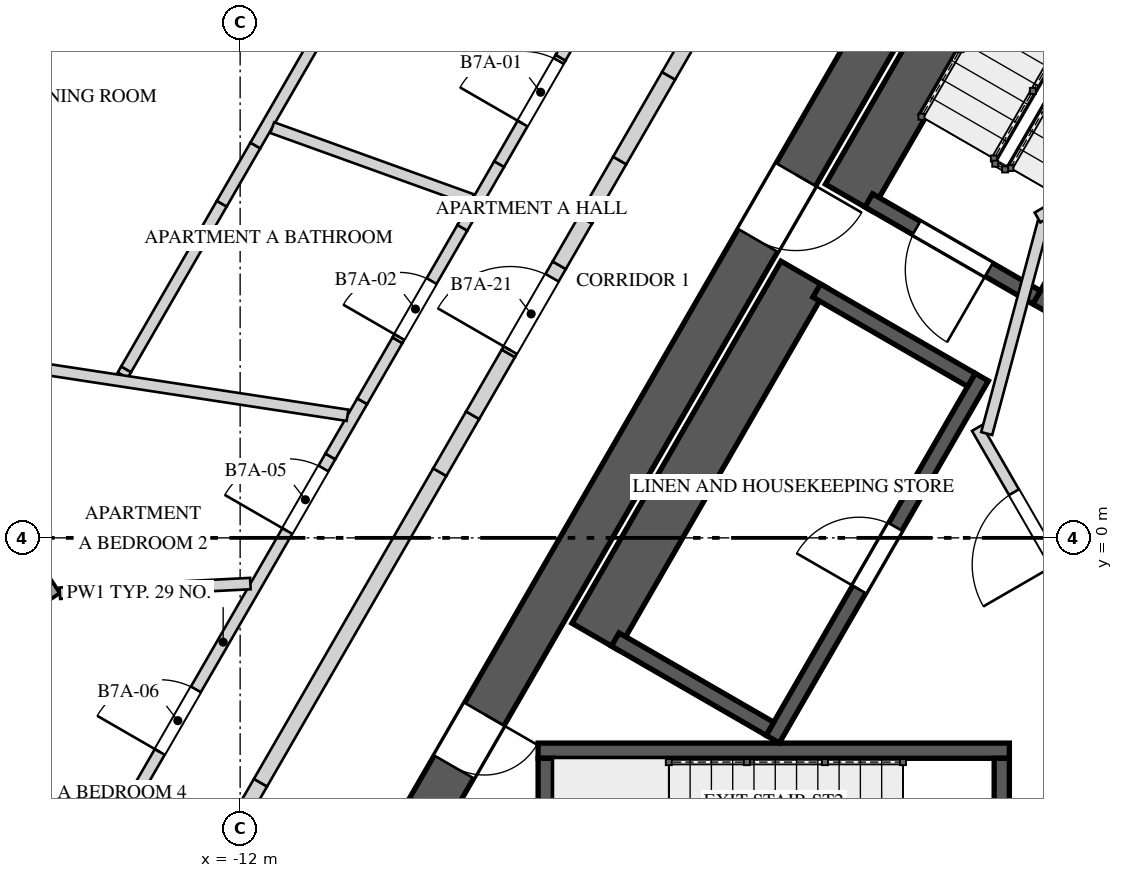
"""IFC4 building model, lengths in metres.
Left out: names, types, materials, properties, quantities, classifications, styles, units other than length and angle.
Written with IfcOpenShell. Run it as: python <this file> out.ifc"""

import sys

from ifc_helpers import new_model, si_unit, direction, frame, frame_2d, origin, place, context, subcontext, project, spatial, polyline, rectangle, outline, extrude, element, fill, save


model = new_model("IFC4")
c1 = context("Model", 3, precision=1e-05, world=origin(), true_north=direction((0.0, 1.0)))
c2 = subcontext(c1, "Body", "Model", "MODEL_VIEW")
j1 = project(units=[si_unit("LENGTHUNIT", "METRE"), si_unit("PLANEANGLEUNIT", "RADIAN")], contexts=[c1])
p1 = place(None, origin())
s1 = spatial("IfcSite", under=j1, at=p1, CompositionType="ELEMENT")
p2 = place(p1, origin())
s2 = spatial("IfcBuilding", under=s1, at=p2, CompositionType="ELEMENT")
p3 = place(p2, frame((0.0, 0.0, 274.4)))
s3 = spatial("IfcBuildingStorey", under=s2, at=p3, CompositionType="ELEMENT", Elevation=274.4)
p4 = place(p3, frame((-1.27, 10.7, 0.0), z_axis=(0.0, 0.0, 1.0), x_axis=(-0.499999536116, -0.866025671608, 0.0)))
e1 = element("IfcWall", 1, at=p4, inside=s3, PredefinedType="SHEAR", context=c2, shape_type="SweptSolid", body=[
    extrude(rectangle(XDim=17.263, YDim=0.6, at=frame_2d((8.631, 0.0))), origin(), (0.0, 0.0, 1.0), 4.0),
])
p5 = place(p4, frame((6.836, 0.0, 0.0)))
e2 = element("IfcOpeningElement", 2, at=p5, cuts=e1, PredefinedType="OPENING", context=c2, shape_type="SweptSolid", body=[
    extrude(rectangle(XDim=1.0, YDim=2.4, at=frame_2d((0.5, 1.2))), frame((0.0, 0.31, 0.0), z_axis=(0.0, -1.0, 0.0), x_axis=(1.0, 0.0, 0.0)), (0.0, 0.0, 1.0), 0.62),
])
p6 = place(p4, frame((15.034, 0.0, 0.0)))
e3 = element("IfcOpeningElement", 3, at=p6, cuts=e1, PredefinedType="OPENING", context=c2, shape_type="SweptSolid", body=[
    extrude(rectangle(XDim=0.8, YDim=2.1, at=frame_2d((0.4, 1.05))), frame((0.0, 0.31, 0.0), z_axis=(0.0, -1.0, 0.0), x_axis=(1.0, 0.0, 0.0)), (0.0, 0.0, 1.0), 0.62),
])
p7 = place(p3, frame((-17.012, -2.263, 0.0), z_axis=(0.0, 0.0, 1.0), x_axis=(0.838664840319, 0.544647854685, 0.0)))
e4 = element("IfcWall", 4, at=p7, inside=s3, PredefinedType="SOLIDWALL", context=c2, shape_type="SweptSolid", body=[
    extrude(rectangle(XDim=3.05, YDim=0.3, at=frame_2d((1.525, 0.0))), origin(), (0.0, 0.0, 1.0), 3.3),
])
p8 = place(p3, frame((-0.896, 9.847, 0.0), z_axis=(0.0, 0.0, 1.0), x_axis=(-0.500009909098, -0.866019682689, 0.0)))
e5 = element("IfcWall", 5, at=p8, inside=s3, PredefinedType="SOLIDWALL", context=c2, shape_type="SweptSolid", body=[
    extrude(rectangle(XDim=6.2, YDim=0.7, at=frame_2d((3.1, 0.0))), origin(), (0.0, 0.0, 1.0), 3.65),
])
p9 = place(p3, frame((1.615, 8.397, 0.0), z_axis=(0.0, 0.0, 1.0), x_axis=(-0.500009909098, -0.866019682689, 0.0)))
e6 = element("IfcWall", 6, at=p9, inside=s3, PredefinedType="SOLIDWALL", context=c2, shape_type="SweptSolid", body=[
    extrude(rectangle(XDim=6.2, YDim=0.2, at=frame_2d((3.1, 0.0))), origin(), (0.0, 0.0, 1.0), 3.65),
])
p10 = place(p3, frame((-1.521, 3.165, 0.0), z_axis=(0.0, 0.0, 1.0), x_axis=(-0.866030925526, 0.499990435942, 0.0)))
e7 = element("IfcWall", 7, at=p10, inside=s3, PredefinedType="SOLIDWALL", context=c2, shape_type="SweptSolid", body=[
    extrude(rectangle(XDim=2.55, YDim=0.2, at=frame_2d((1.275, 0.0))), origin(), (0.0, 0.0, 1.0), 3.65),
])
p11 = place(p10, frame((0.725, 0.0, 0.0)))
e8 = element("IfcOpeningElement", 8, at=p11, cuts=e7, PredefinedType="OPENING", context=c2, shape_type="SweptSolid", body=[
    extrude(rectangle(XDim=1.1, YDim=2.4, at=frame_2d((0.55, 1.2))), frame((0.0, 0.11, 0.0), z_axis=(0.0, -1.0, 0.0), x_axis=(1.0, 0.0, 0.0)), (0.0, 0.0, 1.0), 0.22),
])
p12 = place(p3, frame((-8.08, -2.8, 0.0), z_axis=(0.0, 0.0, 1.0), x_axis=(1.0, 0.0, 0.0)))
e9 = element("IfcWall", 9, at=p12, inside=s3, PredefinedType="SOLIDWALL", context=c2, shape_type="SweptSolid", body=[
    extrude(rectangle(XDim=6.2, YDim=0.2, at=frame_2d((3.1, 0.0))), origin(), (0.0, 0.0, 1.0), 3.65),
])
p13 = place(p3, frame((-7.98, -2.9, 0.0), z_axis=(0.0, 0.0, 1.0), x_axis=(0.0, -1.0, 0.0)))
e10 = element("IfcWall", 10, at=p13, inside=s3, PredefinedType="SOLIDWALL", context=c2, shape_type="SweptSolid", body=[
    extrude(rectangle(XDim=2.55, YDim=0.2, at=frame_2d((1.275, 0.0))), origin(), (0.0, 0.0, 1.0), 3.65),
])
p14 = place(p3, frame((-1.98, -2.9, 0.0), z_axis=(0.0, 0.0, 1.0), x_axis=(0.0, -1.0, 0.0)))
e11 = element("IfcWall", 11, at=p14, inside=s3, PredefinedType="SOLIDWALL", context=c2, shape_type="SweptSolid", body=[
    extrude(rectangle(XDim=2.55, YDim=0.2, at=frame_2d((1.275, 0.0))), origin(), (0.0, 0.0, 1.0), 3.65),
])
p15 = place(p14, frame((0.725, 0.0, 0.0)))
e12 = element("IfcOpeningElement", 12, at=p15, cuts=e11, PredefinedType="OPENING", context=c2, shape_type="SweptSolid", body=[
    extrude(rectangle(XDim=1.1, YDim=2.4, at=frame_2d((0.55, 1.2))), frame((0.0, 0.11, 0.0), z_axis=(0.0, -1.0, 0.0), x_axis=(1.0, 0.0, 0.0)), (0.0, 0.0, 1.0), 0.22),
])
p16 = place(p3, frame((-4.993, -2.648, 0.0), z_axis=(0.0, 0.0, 1.0), x_axis=(0.499996545922, 0.866027397988, 0.0)))
e13 = element("IfcWall", 13, at=p16, inside=s3, PredefinedType="SOLIDWALL", context=c2, shape_type="SweptSolid", body=[
    extrude(rectangle(XDim=5.5, YDim=0.2, at=frame_2d((2.75, 0.0))), origin(), (0.0, 0.0, 1.0), 3.65),
])
p17 = place(p16, frame((2.275, 0.0, 0.0)))
e14 = element("IfcOpeningElement", 14, at=p17, cuts=e13, PredefinedType="OPENING", context=c2, shape_type="SweptSolid", body=[
    extrude(rectangle(XDim=0.95, YDim=2.4, at=frame_2d((0.475, 1.2))), frame((0.0, 0.11, 0.0), z_axis=(0.0, -1.0, 0.0), x_axis=(1.0, 0.0, 0.0)), (0.0, 0.0, 1.0), 0.22),
])
p18 = place(p3, frame((-4.581, 3.465, 0.0), z_axis=(0.0, 0.0, 1.0), x_axis=(-0.499996545922, -0.866027397988, 0.0)))
e15 = element("IfcWall", 15, at=p18, inside=s3, PredefinedType="SOLIDWALL", context=c2, shape_type="SweptSolid", body=[
    extrude(rectangle(XDim=5.5, YDim=0.7, at=frame_2d((2.75, 0.0))), origin(), (0.0, 0.0, 1.0), 3.65),
])
p19 = place(p3, frame((-2.38, 2.078, 0.0), z_axis=(0.0, 0.0, 1.0), x_axis=(-0.866061024631, 0.499938297808, 0.0)))
e16 = element("IfcWall", 16, at=p19, inside=s3, PredefinedType="SOLIDWALL", context=c2, shape_type="SweptSolid", body=[
    extrude(rectangle(XDim=2.35, YDim=0.2, at=frame_2d((1.175, 0.0))), origin(), (0.0, 0.0, 1.0), 3.65),
])
p20 = place(p3, frame((-5.03, -2.512, 0.0), z_axis=(0.0, 0.0, 1.0), x_axis=(-0.866016039709, 0.500016218704, 0.0)))
e17 = element("IfcWall", 17, at=p20, inside=s3, PredefinedType="SOLIDWALL", context=c2, shape_type="SweptSolid", body=[
    extrude(rectangle(XDim=2.35, YDim=0.2, at=frame_2d((1.175, 0.0))), origin(), (0.0, 0.0, 1.0), 3.65),
])
p21 = place(p3, frame((-0.744, -1.261, 0.0), z_axis=(0.0, 0.0, 1.0), x_axis=(-0.500004234368, 0.866022959057, 0.0)))
e18 = element("IfcWall", 18, at=p21, inside=s3, PredefinedType="PARTITIONING", context=c2, shape_type="SweptSolid", body=[
    extrude(rectangle(XDim=3.125, YDim=0.15, at=frame_2d((1.562, 0.0))), origin(), (0.0, 0.0, 1.0), 3.65),
])
p22 = place(p21, frame((1.05, 0.0, 0.0)))
e19 = element("IfcOpeningElement", 19, at=p22, cuts=e18, PredefinedType="OPENING", context=c2, shape_type="SweptSolid", body=[
    extrude(rectangle(XDim=1.1, YDim=2.4, at=frame_2d((0.55, 1.2))), frame((0.0, 0.085, 0.0), z_axis=(0.0, -1.0, 0.0), x_axis=(1.0, 0.0, 0.0)), (0.0, 0.0, 1.0), 0.17),
])
p23 = place(p3, frame((-2.178, 1.372, 0.0), z_axis=(0.0, 0.0, 1.0), x_axis=(0.258808958833, 0.96592852884, 0.0)))
e20 = element("IfcWall", 20, at=p23, inside=s3, PredefinedType="PARTITIONING", context=c2, shape_type="SweptSolid", body=[
    extrude(rectangle(XDim=2.903, YDim=0.15, at=frame_2d((1.451, 0.0))), origin(), (0.0, 0.0, 1.0), 3.65),
])
p24 = place(p3, frame((-1.51, 4.215, 0.0), z_axis=(0.0, 0.0, 1.0), x_axis=(0.866085525409, 0.49989585183, 0.0)))
e21 = element("IfcWall", 21, at=p24, inside=s3, PredefinedType="PARTITIONING", context=c2, shape_type="SweptSolid", body=[
    extrude(rectangle(XDim=1.3, YDim=0.15, at=frame_2d((0.65, 0.0))), origin(), (0.0, 0.0, 1.0), 3.65),
])
p25 = place(p3, frame((-13.634, -3.815, 0.0), z_axis=(0.0, 0.0, 1.0), x_axis=(0.500005829693, 0.866022037983, 0.0)))
e22 = element("IfcWall", 22, at=p25, inside=s3, PredefinedType="PARTITIONING", context=c2, shape_type="SweptSolid", body=[
    extrude(rectangle(XDim=5.643, YDim=0.15, at=frame_2d((2.822, 0.0))), origin(), (0.0, 0.0, 1.0), 3.65),
])
p26 = place(p25, frame((4.51, 0.0, 0.0)))
e23 = element("IfcOpeningElement", 23, at=p26, cuts=e22, PredefinedType="OPENING", context=c2, shape_type="SweptSolid", body=[
    extrude(rectangle(XDim=0.95, YDim=2.4, at=frame_2d((0.475, 1.2))), frame((0.0, 0.085, 0.0), z_axis=(0.0, -1.0, 0.0), x_axis=(1.0, 0.0, 0.0)), (0.0, 0.0, 1.0), 0.17),
])
p27 = place(p25, frame((1.154, 0.0, 0.0)))
e24 = element("IfcOpeningElement", 24, at=p27, cuts=e22, PredefinedType="OPENING", context=c2, shape_type="SweptSolid", body=[
    extrude(rectangle(XDim=0.95, YDim=2.4, at=frame_2d((0.475, 1.2))), frame((0.0, 0.085, 0.0), z_axis=(0.0, -1.0, 0.0), x_axis=(1.0, 0.0, 0.0)), (0.0, 0.0, 1.0), 0.17),
])
p28 = place(p3, frame((-10.813, 1.072, 0.0), z_axis=(0.0, 0.0, 1.0), x_axis=(0.500025132165, 0.866010893236, 0.0)))
e25 = element("IfcWall", 25, at=p28, inside=s3, PredefinedType="PARTITIONING", context=c2, shape_type="SweptSolid", body=[
    extrude(rectangle(XDim=0.838, YDim=0.15, at=frame_2d((0.419, 0.0))), origin(), (0.0, 0.0, 1.0), 2.75),
])
p29 = place(p3, frame((-10.394, 1.797, 0.0), z_axis=(0.0, 0.0, 1.0), x_axis=(0.499996383721, 0.866027491634, 0.0)))
e26 = element("IfcWall", 26, at=p29, inside=s3, PredefinedType="PARTITIONING", context=c2, shape_type="SweptSolid", body=[
    extrude(rectangle(XDim=0.926, YDim=0.15, at=frame_2d((0.463, 0.0))), origin(), (0.0, 0.0, 1.0), 3.65),
])
p30 = place(p3, frame((-9.931, 2.599, 0.0), z_axis=(0.0, 0.0, 1.0), x_axis=(0.500056273262, 0.865992911964, 0.0)))
e27 = element("IfcWall", 27, at=p30, inside=s3, PredefinedType="PARTITIONING", context=c2, shape_type="SweptSolid", body=[
    extrude(outline(polyline([(0.0, 0.0), (1.709, 0.0), (1.709, 2.55), (0.825, 2.55), (0.825, 3.65), (0.0, 3.65), (0.0, 0.0)])), frame((0.0, 0.075, 0.0), z_axis=(0.0, -1.0, 0.0), x_axis=(1.0, 0.0, 0.0)), (0.0, 0.0, 1.0), 0.15),
])
p31 = place(p30, frame((0.05, 0.0, 0.0)))
e28 = element("IfcOpeningElement", 28, at=p31, cuts=e27, PredefinedType="OPENING", context=c2, shape_type="SweptSolid", body=[
    extrude(rectangle(XDim=0.85, YDim=2.4, at=frame_2d((0.425, 1.2))), frame((0.0, 0.085, 0.0), z_axis=(0.0, -1.0, 0.0), x_axis=(1.0, 0.0, 0.0)), (0.0, 0.0, 1.0), 0.17),
])
p32 = place(p3, frame((-9.076, 4.079, 0.0), z_axis=(0.0, 0.0, 1.0), x_axis=(0.499882561262, 0.866093196455, 0.0)))
e29 = element("IfcWall", 29, at=p32, inside=s3, PredefinedType="PARTITIONING", context=c2, shape_type="SweptSolid", body=[
    extrude(rectangle(XDim=0.968, YDim=0.15, at=frame_2d((0.484, 0.0))), origin(), (0.0, 0.0, 1.0), 3.65),
])
p33 = place(p3, frame((-8.592, 4.918, 0.0), z_axis=(0.0, 0.0, 1.0), x_axis=(0.500005767435, 0.866022073929, 0.0)))
e30 = element("IfcWall", 30, at=p33, inside=s3, PredefinedType="PARTITIONING", context=c2, shape_type="SweptSolid", body=[
    extrude(outline(polyline([(0.0, 0.0), (1.616, 0.0), (1.616, 3.65), (0.876, 3.65), (0.876, 2.55), (0.0, 2.55), (0.0, 0.0)])), frame((0.0, 0.075, 0.0), z_axis=(0.0, -1.0, 0.0), x_axis=(1.0, 0.0, 0.0)), (0.0, 0.0, 1.0), 0.15),
])
p34 = place(p33, frame((0.616, 0.0, 0.0)))
e31 = element("IfcOpeningElement", 31, at=p34, cuts=e30, PredefinedType="OPENING", context=c2, shape_type="SweptSolid", body=[
    extrude(rectangle(XDim=0.95, YDim=2.4, at=frame_2d((0.475, 1.2))), frame((0.0, 0.085, 0.0), z_axis=(0.0, -1.0, 0.0), x_axis=(1.0, 0.0, 0.0)), (0.0, 0.0, 1.0), 0.17),
])
p35 = place(p3, frame((-7.784, 6.317, 0.0), z_axis=(0.0, 0.0, 1.0), x_axis=(0.499884784933, 0.866091913016, 0.0)))
e32 = element("IfcWall", 32, at=p35, inside=s3, PredefinedType="PARTITIONING", context=c2, shape_type="SweptSolid", body=[
    extrude(rectangle(XDim=0.911, YDim=0.15, at=frame_2d((0.456, 0.0))), origin(), (0.0, 0.0, 1.0), 3.65),
])
p36 = place(p3, frame((-13.545, 2.139, 0.0), z_axis=(0.0, 0.0, 1.0), x_axis=(0.499332966107, 0.866410173624, 0.0)))
e33 = element("IfcWall", 33, at=p36, inside=s3, PredefinedType="PARTITIONING", context=c2, shape_type="SweptSolid", body=[
    extrude(rectangle(XDim=0.09, YDim=0.15, at=frame_2d((0.045, 0.0))), origin(), (0.0, 0.0, 1.0), 2.75),
])
p37 = place(p3, frame((-13.5, 2.218, 0.0), z_axis=(0.0, 0.0, 1.0), x_axis=(0.500010832295, 0.866019149666, 0.0)))
e34 = element("IfcWall", 34, at=p37, inside=s3, PredefinedType="PARTITIONING", context=c2, shape_type="SweptSolid", body=[
    extrude(rectangle(XDim=2.516, YDim=0.15, at=frame_2d((1.258, 0.0))), origin(), (0.0, 0.0, 1.0), 3.65),
])
p38 = place(p3, frame((-12.242, 4.396, 0.0), z_axis=(0.0, 0.0, 1.0), x_axis=(0.500088960417, 0.865974036371, 0.0)))
e35 = element("IfcWall", 35, at=p38, inside=s3, PredefinedType="PARTITIONING", context=c2, shape_type="SweptSolid", body=[
    extrude(rectangle(XDim=0.884, YDim=0.15, at=frame_2d((0.442, 0.0))), origin(), (0.0, 0.0, 1.0), 2.55),
])
p39 = place(p3, frame((-11.8, 5.162, 0.0), z_axis=(0.0, 0.0, 1.0), x_axis=(0.500035089595, 0.866005143849, 0.0)))
e36 = element("IfcWall", 36, at=p39, inside=s3, PredefinedType="PARTITIONING", context=c2, shape_type="SweptSolid", body=[
    extrude(rectangle(XDim=1.51, YDim=0.15, at=frame_2d((0.755, 0.0))), origin(), (0.0, 0.0, 1.0), 3.65),
])
p40 = place(p3, frame((-11.865, -0.601, 0.0), z_axis=(0.0, 0.0, 1.0), x_axis=(-0.99871519822, -0.050674972563, 0.0)))
e37 = element("IfcWall", 37, at=p40, inside=s3, PredefinedType="PARTITIONING", context=c2, shape_type="SweptSolid", body=[
    extrude(rectangle(XDim=2.51, YDim=0.15, at=frame_2d((1.255, 0.0))), origin(), (0.0, 0.0, 1.0), 3.65),
])
p41 = place(p3, frame((-10.587, 1.613, 0.0), z_axis=(0.0, 0.0, 1.0), x_axis=(-0.988598095377, 0.150578238191, 0.0)))
e38 = element("IfcWall", 38, at=p41, inside=s3, PredefinedType="PARTITIONING", context=c2, shape_type="SweptSolid", body=[
    extrude(rectangle(XDim=8.833, YDim=0.15, at=frame_2d((4.417, 0.0))), origin(), (0.0, 0.0, 1.0), 2.75),
])
p42 = place(p3, frame((-8.949, 4.449, 0.0), z_axis=(0.0, 0.0, 1.0), x_axis=(-0.940703467008, 0.33922999154, 0.0)))
e39 = element("IfcWall", 39, at=p42, inside=s3, PredefinedType="PARTITIONING", context=c2, shape_type="SweptSolid", body=[
    extrude(rectangle(XDim=2.794, YDim=0.15, at=frame_2d((1.397, 0.0))), origin(), (0.0, 0.0, 1.0), 3.65),
])
p43 = place(p3, frame((-12.326, -4.25, 0.0), z_axis=(0.0, 0.0, 1.0), x_axis=(0.499983247966, 0.86603507536, 0.0)))
e40 = element("IfcWall", 40, at=p43, inside=s3, PredefinedType="SOLIDWALL", context=c2, shape_type="SweptSolid", body=[
    extrude(rectangle(XDim=1.188, YDim=0.2, at=frame_2d((0.594, 0.0))), origin(), (0.0, 0.0, 1.0), 2.95),
])
p44 = place(p3, frame((-11.732, -3.221, 0.0), z_axis=(0.0, 0.0, 1.0), x_axis=(0.500007683529, 0.866020967652, 0.0)))
e41 = element("IfcWall", 41, at=p44, inside=s3, PredefinedType="SOLIDWALL", context=c2, shape_type="SweptSolid", body=[
    extrude(rectangle(XDim=4.717, YDim=0.2, at=frame_2d((2.359, 0.0))), origin(), (0.0, 0.0, 1.0), 3.65),
])
p45 = place(p3, frame((-9.374, 0.865, 0.0), z_axis=(0.0, 0.0, 1.0), x_axis=(0.500056482814, 0.86599279096, 0.0)))
e42 = element("IfcWall", 42, at=p45, inside=s3, PredefinedType="SOLIDWALL", context=c2, shape_type="SweptSolid", body=[
    extrude(rectangle(XDim=0.865, YDim=0.2, at=frame_2d((0.432, 0.0))), origin(), (0.0, 0.0, 1.0), 2.75),
])
p46 = place(p3, frame((-8.941, 1.613, 0.0), z_axis=(0.0, 0.0, 1.0), x_axis=(0.499857464265, 0.866107681191, 0.0)))
e43 = element("IfcWall", 43, at=p46, inside=s3, PredefinedType="SOLIDWALL", context=c2, shape_type="SweptSolid", body=[
    extrude(rectangle(XDim=0.939, YDim=0.2, at=frame_2d((0.47, 0.0))), origin(), (0.0, 0.0, 1.0), 3.65),
])
p47 = place(p3, frame((-8.472, 2.427, 0.0), z_axis=(0.0, 0.0, 1.0), x_axis=(0.500022371132, 0.86601248742, 0.0)))
e44 = element("IfcWall", 44, at=p47, inside=s3, PredefinedType="SOLIDWALL", context=c2, shape_type="SweptSolid", body=[
    extrude(outline(polyline([(0.0, 0.0), (1.339, 0.0), (1.339, 2.55), (0.429, 2.55), (0.429, 3.65), (0.0, 3.65), (0.0, 0.0)])), frame((0.0, 0.1, 0.0), z_axis=(0.0, -1.0, 0.0), x_axis=(1.0, 0.0, 0.0)), (0.0, 0.0, 1.0), 0.2),
])
p48 = place(p47, frame((0.05, 0.0, 0.0)))
e45 = element("IfcOpeningElement", 45, at=p48, cuts=e44, PredefinedType="OPENING", context=c2, shape_type="SweptSolid", body=[
    extrude(rectangle(XDim=1.1, YDim=2.4, at=frame_2d((0.55, 1.2))), frame((0.0, 0.11, 0.0), z_axis=(0.0, -1.0, 0.0), x_axis=(1.0, 0.0, 0.0)), (0.0, 0.0, 1.0), 0.22),
])
p49 = place(p3, frame((-7.802, 3.586, 0.0), z_axis=(0.0, 0.0, 1.0), x_axis=(0.500242282693, 0.865885476611, 0.0)))
e46 = element("IfcWall", 46, at=p49, inside=s3, PredefinedType="SOLIDWALL", context=c2, shape_type="SweptSolid", body=[
    extrude(rectangle(XDim=0.691, YDim=0.2, at=frame_2d((0.346, 0.0))), origin(), (0.0, 0.0, 1.0), 3.65),
])
p50 = place(p3, frame((-7.457, 4.185, 0.0), z_axis=(0.0, 0.0, 1.0), x_axis=(0.499753735824, 0.866167537795, 0.0)))
e47 = element("IfcWall", 47, at=p50, inside=s3, PredefinedType="SOLIDWALL", context=c2, shape_type="SweptSolid", body=[
    extrude(rectangle(XDim=0.901, YDim=0.2, at=frame_2d((0.45, 0.0))), origin(), (0.0, 0.0, 1.0), 2.55),
])
p51 = place(p3, frame((-7.006, 4.965, 0.0), z_axis=(0.0, 0.0, 1.0), x_axis=(0.500018234033, 0.866014876105, 0.0)))
e48 = element("IfcWall", 48, at=p51, inside=s3, PredefinedType="SOLIDWALL", context=c2, shape_type="SweptSolid", body=[
    extrude(rectangle(XDim=1.286, YDim=0.2, at=frame_2d((0.643, 0.0))), origin(), (0.0, 0.0, 1.0), 3.65),
])
p52 = place(p3, frame((-6.363, 6.079, 0.0), z_axis=(0.0, 0.0, 1.0), x_axis=(0.499950631041, 0.86605390509, 0.0)))
e49 = element("IfcWall", 49, at=p52, inside=s3, PredefinedType="SOLIDWALL", context=c2, shape_type="SweptSolid", body=[
    extrude(rectangle(XDim=0.833, YDim=0.2, at=frame_2d((0.417, 0.0))), origin(), (0.0, 0.0, 1.0), 2.75),
])
p53 = place(p11, origin())
e50 = element("IfcDoor", 50, at=p53, inside=s3, OperationType="SINGLE_SWING_RIGHT", PredefinedType="DOOR", context=c2, shape_type="SweptSolid", body=[
    extrude(rectangle(XDim=1.1, YDim=2.4, at=frame_2d((0.55, 1.2))), frame((0.0, 0.025, 0.0), z_axis=(0.0, -1.0, 0.0), x_axis=(1.0, 0.0, 0.0)), (0.0, 0.0, 1.0), 0.05),
])
fill(e8, e50)
p54 = place(p17, origin())
e51 = element("IfcDoor", 51, at=p54, inside=s3, OperationType="SINGLE_SWING_LEFT", PredefinedType="DOOR", context=c2, shape_type="SweptSolid", body=[
    extrude(rectangle(XDim=0.95, YDim=2.4, at=frame_2d((0.475, 1.2))), frame((0.0, 0.025, 0.0), z_axis=(0.0, -1.0, 0.0), x_axis=(1.0, 0.0, 0.0)), (0.0, 0.0, 1.0), 0.05),
])
fill(e14, e51)
p55 = place(p22, origin())
e52 = element("IfcDoor", 52, at=p55, inside=s3, OperationType="SINGLE_SWING_RIGHT", PredefinedType="DOOR", context=c2, shape_type="SweptSolid", body=[
    extrude(rectangle(XDim=1.1, YDim=2.4, at=frame_2d((0.55, 1.2))), frame((0.0, 0.025, 0.0), z_axis=(0.0, -1.0, 0.0), x_axis=(1.0, 0.0, 0.0)), (0.0, 0.0, 1.0), 0.05),
])
fill(e19, e52)
p56 = place(p5, origin())
e53 = element("IfcDoor", 53, at=p56, inside=s3, OperationType="SINGLE_SWING_LEFT", PredefinedType="DOOR", context=c2, shape_type="SweptSolid", body=[
    extrude(rectangle(XDim=1.0, YDim=2.4, at=frame_2d((0.5, 1.2))), frame((0.0, 0.025, 0.0), z_axis=(0.0, -1.0, 0.0), x_axis=(1.0, 0.0, 0.0)), (0.0, 0.0, 1.0), 0.05),
])
fill(e2, e53)
p57 = place(p6, origin())
e54 = element("IfcDoor", 54, at=p57, inside=s3, OperationType="SINGLE_SWING_RIGHT", PredefinedType="DOOR", context=c2, shape_type="SweptSolid", body=[
    extrude(rectangle(XDim=0.8, YDim=2.1, at=frame_2d((0.4, 1.05))), frame((0.0, 0.025, 0.0), z_axis=(0.0, -1.0, 0.0), x_axis=(1.0, 0.0, 0.0)), (0.0, 0.0, 1.0), 0.05),
])
fill(e3, e54)
p58 = place(p34, origin())
e55 = element("IfcDoor", 55, at=p58, inside=s3, OperationType="SINGLE_SWING_LEFT", PredefinedType="DOOR", context=c2, shape_type="SweptSolid", body=[
    extrude(rectangle(XDim=0.95, YDim=2.4, at=frame_2d((0.475, 1.2))), frame((0.0, 0.025, 0.0), z_axis=(0.0, -1.0, 0.0), x_axis=(1.0, 0.0, 0.0)), (0.0, 0.0, 1.0), 0.05),
])
fill(e31, e55)
p59 = place(p31, origin())
e56 = element("IfcDoor", 56, at=p59, inside=s3, OperationType="SINGLE_SWING_RIGHT", PredefinedType="DOOR", context=c2, shape_type="SweptSolid", body=[
    extrude(rectangle(XDim=0.85, YDim=2.4, at=frame_2d((0.425, 1.2))), frame((0.0, 0.025, 0.0), z_axis=(0.0, -1.0, 0.0), x_axis=(1.0, 0.0, 0.0)), (0.0, 0.0, 1.0), 0.05),
])
fill(e28, e56)
p60 = place(p26, origin())
e57 = element("IfcDoor", 57, at=p60, inside=s3, OperationType="SINGLE_SWING_LEFT", PredefinedType="DOOR", context=c2, shape_type="SweptSolid", body=[
    extrude(rectangle(XDim=0.95, YDim=2.4, at=frame_2d((0.475, 1.2))), frame((0.0, 0.025, 0.0), z_axis=(0.0, -1.0, 0.0), x_axis=(1.0, 0.0, 0.0)), (0.0, 0.0, 1.0), 0.05),
])
fill(e23, e57)
p61 = place(p27, origin())
e58 = element("IfcDoor", 58, at=p61, inside=s3, OperationType="SINGLE_SWING_RIGHT", PredefinedType="DOOR", context=c2, shape_type="SweptSolid", body=[
    extrude(rectangle(XDim=0.95, YDim=2.4, at=frame_2d((0.475, 1.2))), frame((0.0, 0.025, 0.0), z_axis=(0.0, -1.0, 0.0), x_axis=(1.0, 0.0, 0.0)), (0.0, 0.0, 1.0), 0.05),
])
fill(e24, e58)
p62 = place(p48, origin())
e59 = element("IfcDoor", 59, at=p62, inside=s3, OperationType="SINGLE_SWING_LEFT", PredefinedType="DOOR", context=c2, shape_type="SweptSolid", body=[
    extrude(rectangle(XDim=1.1, YDim=2.4, at=frame_2d((0.55, 1.2))), frame((0.0, 0.025, 0.0), z_axis=(0.0, -1.0, 0.0), x_axis=(1.0, 0.0, 0.0)), (0.0, 0.0, 1.0), 0.05),
])
fill(e45, e59)
save(model, sys.argv[1])
